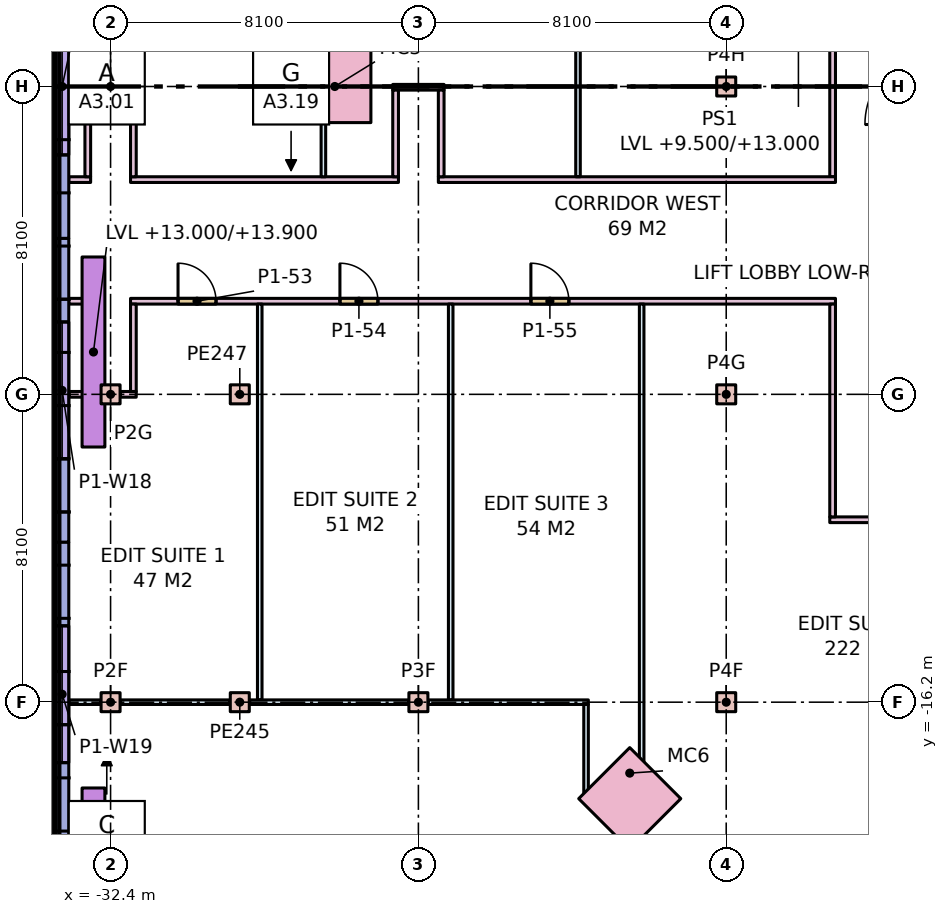
"""IFC4 building model, lengths in metres.
Left out: names, types, materials, properties, quantities, classifications, styles, units other than length and angle.
Written with IfcOpenShell. Run it as: python <this file> out.ifc"""

import sys

from ifc_helpers import new_model, si_unit, direction, frame, frame_2d, origin, origin_2d, place, context, subcontext, project, spatial, rectangle, extrude, element, fill, save


model = new_model("IFC4")
c1 = context("Model", 3, precision=1e-05, world=origin(), true_north=direction((0.0, 1.0)))
c2 = subcontext(c1, "Body", "Model", "MODEL_VIEW")
j1 = project(units=[si_unit("LENGTHUNIT", "METRE"), si_unit("PLANEANGLEUNIT", "RADIAN")], contexts=[c1])
p1 = place(None, origin())
s1 = spatial("IfcSite", under=j1, at=p1, CompositionType="ELEMENT")
p2 = place(p1, origin())
s2 = spatial("IfcBuilding", under=s1, at=p2, CompositionType="ELEMENT")
p3 = place(p2, frame((0.0, 0.0, 6.0)))
s3 = spatial("IfcBuildingStorey", under=s2, at=p3, CompositionType="ELEMENT", Elevation=6.0)
for number, where, z_axis, x_axis in (
    (1, (-32.4, -16.2, 0.0), (0.0, 0.0, 1.0), (1.0, 0.0, 0.0)),
    (2, (-32.4, -8.1, 0.0), (0.0, 0.0, 1.0), (1.0, 0.0, 0.0)),
    (3, (-32.4, 0.0, 0.0), (0.0, 0.0, 1.0), (1.0, 0.0, 0.0)),
    (4, (-24.3, -16.2, 0.0), (0.0, 0.0, 1.0), (1.0, 0.0, 0.0)),
    (5, (-16.2, -16.2, 0.0), (0.0, 0.0, 1.0), (1.0, 0.0, 0.0)),
    (6, (-16.2, -8.1, 0.0), (0.0, 0.0, 1.0), (1.0, 0.0, 0.0)),
    (7, (-16.2, 0.0, 0.0), (0.0, 0.0, 1.0), (1.0, 0.0, 0.0)),
    (8, (-29.0, -16.2, 0.0), (0.0, 0.0, 1.0), (1.0, 0.0, 0.0)),
    (9, (-29.0, -8.1, 0.0), (0.0, 0.0, 1.0), (1.0, 0.0, 0.0)),
):
    element("IfcColumn", number, at=place(p3, frame(where, z_axis=z_axis, x_axis=x_axis)), inside=s3, PredefinedType="COLUMN", context=c2, shape_type="SweptSolid", body=[
        extrude(rectangle(XDim=0.5, YDim=0.5, at=origin_2d()), origin(), (0.0, 0.0, 1.0), 7.0),
    ])
for number, where, z_axis, x_axis in (
    (10, (-26.5, 0.0, 0.0), (0.0, 0.0, 1.0), (0.0, -1.0, 0.0)),
    (11, (-18.738, -18.738, 0.0), (0.0, 0.0, 1.0), (0.707, -0.707, 0.0)),
):
    element("IfcColumn", number, at=place(p3, frame(where, z_axis=z_axis, x_axis=x_axis)), inside=s3, PredefinedType="COLUMN", context=c2, shape_type="SweptSolid", body=[
        extrude(rectangle(XDim=1.9, YDim=1.9, at=origin_2d()), origin(), (0.0, 0.0, 1.0), 7.0),
    ])
p4 = place(p3, frame((-33.675, 3.998, 0.0), z_axis=(0.0, 0.0, 1.0), x_axis=(0.0, -1.0, 0.0)))
e12 = element("IfcWall", 12, at=p4, inside=s3, PredefinedType="STANDARD", context=c2, shape_type="SweptSolid", body=[
    extrude(rectangle(XDim=7.996, YDim=0.35, at=frame_2d((3.998, 0.0))), origin(), (0.0, 0.0, 1.0), 6.68),
])
p5 = place(p4, frame((2.198, 0.0, 1.0)))
e13 = element("IfcOpeningElement", 13, at=p5, cuts=e12, PredefinedType="OPENING", context=c2, shape_type="SweptSolid", body=[
    extrude(rectangle(XDim=3.6, YDim=4.0, at=frame_2d((1.8, 2.0))), frame((0.0, 0.185, 0.0), z_axis=(0.0, -1.0, 0.0), x_axis=(1.0, 0.0, 0.0)), (0.0, 0.0, 1.0), 0.37),
])
p6 = place(p3, frame((-33.675, -3.998, 0.0), z_axis=(0.0, 0.0, 1.0), x_axis=(0.0, -1.0, 0.0)))
e14 = element("IfcWall", 14, at=p6, inside=s3, PredefinedType="STANDARD", context=c2, shape_type="SweptSolid", body=[
    extrude(rectangle(XDim=7.995, YDim=0.35, at=frame_2d((3.998, 0.0))), origin(), (0.0, 0.0, 1.0), 6.68),
])
p7 = place(p6, frame((2.198, 0.0, 1.0)))
e15 = element("IfcOpeningElement", 15, at=p7, cuts=e14, PredefinedType="OPENING", context=c2, shape_type="SweptSolid", body=[
    extrude(rectangle(XDim=3.6, YDim=4.0, at=frame_2d((1.8, 2.0))), frame((0.0, 0.185, 0.0), z_axis=(0.0, -1.0, 0.0), x_axis=(1.0, 0.0, 0.0)), (0.0, 0.0, 1.0), 0.37),
])
p8 = place(p3, frame((-33.675, -11.993, 0.0), z_axis=(0.0, 0.0, 1.0), x_axis=(0.0, -1.0, 0.0)))
e16 = element("IfcWall", 16, at=p8, inside=s3, PredefinedType="STANDARD", context=c2, shape_type="SweptSolid", body=[
    extrude(rectangle(XDim=7.995, YDim=0.35, at=frame_2d((3.998, 0.0))), origin(), (0.0, 0.0, 1.0), 6.68),
])
p9 = place(p8, frame((2.198, 0.0, 1.0)))
e17 = element("IfcOpeningElement", 17, at=p9, cuts=e16, PredefinedType="OPENING", context=c2, shape_type="SweptSolid", body=[
    extrude(rectangle(XDim=3.6, YDim=4.0, at=frame_2d((1.8, 2.0))), frame((0.0, 0.185, 0.0), z_axis=(0.0, -1.0, 0.0), x_axis=(1.0, 0.0, 0.0)), (0.0, 0.0, 1.0), 0.37),
])
for number, where, z_axis, x_axis in (
    (18, (-32.85, -4.486, 7.0), (0.0, 0.0, 1.0), (0.0, -1.0, 0.0)),
    (19, (-32.85, -18.458, 7.0), (0.0, 0.0, 1.0), (0.0, -1.0, 0.0)),
):
    element("IfcWall", number, at=place(p3, frame(where, z_axis=z_axis, x_axis=x_axis)), inside=s3, PredefinedType="PARAPET", context=c2, shape_type="SweptSolid", body=[
        extrude(rectangle(XDim=5.0, YDim=0.6, at=frame_2d((2.5, 0.0))), origin(), (0.0, 0.0, 1.0), 0.9),
    ])
p10 = place(p3, frame((-28.475, -16.14, 0.0), z_axis=(0.0, 0.0, 1.0), x_axis=(0.0, 1.0, 0.0)))
e20 = element("IfcWall", 20, at=p10, inside=s3, PredefinedType="PARTITIONING", context=c2, shape_type="SweptSolid", body=[
    extrude(rectangle(XDim=10.415, YDim=0.12, at=frame_2d((5.208, 0.0))), origin(), (0.0, 0.0, 1.0), 6.68),
])
p11 = place(p3, frame((-33.5, -16.2, 0.0), z_axis=(0.0, 0.0, 1.0), x_axis=(1.0, 0.0, 0.0)))
e21 = element("IfcWall", 21, at=p11, inside=s3, PredefinedType="PARTITIONING", context=c2, shape_type="SweptSolid", body=[
    extrude(rectangle(XDim=0.84, YDim=0.12, at=frame_2d((0.42, 0.0))), origin(), (0.0, 0.0, 1.0), 6.68),
])
p12 = place(p3, frame((-32.14, -16.2, 0.0), z_axis=(0.0, 0.0, 1.0), x_axis=(1.0, 0.0, 0.0)))
e22 = element("IfcWall", 22, at=p12, inside=s3, PredefinedType="PARTITIONING", context=c2, shape_type="SweptSolid", body=[
    extrude(rectangle(XDim=2.88, YDim=0.12, at=frame_2d((1.44, 0.0))), origin(), (0.0, 0.0, 1.0), 6.68),
])
p13 = place(p3, frame((-28.74, -16.2, 0.0), z_axis=(0.0, 0.0, 1.0), x_axis=(1.0, 0.0, 0.0)))
e23 = element("IfcWall", 23, at=p13, inside=s3, PredefinedType="PARTITIONING", context=c2, shape_type="SweptSolid", body=[
    extrude(rectangle(XDim=4.18, YDim=0.12, at=frame_2d((2.09, 0.0))), origin(), (0.0, 0.0, 1.0), 6.68),
])
p14 = place(p3, frame((-33.49, -8.1, 0.0), z_axis=(0.0, 0.0, 1.0), x_axis=(1.0, 0.0, 0.0)))
e24 = element("IfcWall", 24, at=p14, inside=s3, PredefinedType="PARTITIONING", context=c2, shape_type="SweptSolid", body=[
    extrude(rectangle(XDim=0.83, YDim=0.15, at=frame_2d((0.415, 0.0))), origin(), (0.0, 0.0, 1.0), 6.68),
])
p15 = place(p3, frame((-32.14, -8.1, 0.0), z_axis=(0.0, 0.0, 1.0), x_axis=(1.0, 0.0, 0.0)))
e25 = element("IfcWall", 25, at=p15, inside=s3, PredefinedType="PARTITIONING", context=c2, shape_type="SweptSolid", body=[
    extrude(rectangle(XDim=0.415, YDim=0.15, at=frame_2d((0.208, 0.0))), origin(), (0.0, 0.0, 1.0), 6.68),
])
p16 = place(p3, frame((-33.5, -5.65, 0.0), z_axis=(0.0, 0.0, 1.0), x_axis=(1.0, 0.0, 0.0)))
e26 = element("IfcWall", 26, at=p16, inside=s3, PredefinedType="PARTITIONING", context=c2, shape_type="SweptSolid", body=[
    extrude(rectangle(XDim=0.575, YDim=0.15, at=frame_2d((0.288, 0.0))), origin(), (0.0, 0.0, 1.0), 6.68),
])
p17 = place(p3, frame((-31.875, -5.65, 0.0), z_axis=(0.0, 0.0, 1.0), x_axis=(1.0, 0.0, 0.0)))
e27 = element("IfcWall", 27, at=p17, inside=s3, PredefinedType="PARTITIONING", context=c2, shape_type="SweptSolid", body=[
    extrude(rectangle(XDim=18.55, YDim=0.15, at=frame_2d((9.275, 0.0))), origin(), (0.0, 0.0, 1.0), 6.68),
])
p18 = place(p17, frame((1.25, 0.0, 0.0)))
e28 = element("IfcOpeningElement", 28, at=p18, cuts=e27, PredefinedType="OPENING", context=c2, shape_type="SweptSolid", body=[
    extrude(rectangle(XDim=1.0, YDim=2.1, at=frame_2d((0.5, 1.05))), frame((0.0, 0.085, 0.0), z_axis=(0.0, -1.0, 0.0), x_axis=(1.0, 0.0, 0.0)), (0.0, 0.0, 1.0), 0.17),
])
p19 = place(p17, frame((5.51, 0.0, 0.0)))
e29 = element("IfcOpeningElement", 29, at=p19, cuts=e27, PredefinedType="OPENING", context=c2, shape_type="SweptSolid", body=[
    extrude(rectangle(XDim=1.0, YDim=2.1, at=frame_2d((0.5, 1.05))), frame((0.0, 0.085, 0.0), z_axis=(0.0, -1.0, 0.0), x_axis=(1.0, 0.0, 0.0)), (0.0, 0.0, 1.0), 0.17),
])
p20 = place(p17, frame((10.535, 0.0, 0.0)))
e30 = element("IfcOpeningElement", 30, at=p20, cuts=e27, PredefinedType="OPENING", context=c2, shape_type="SweptSolid", body=[
    extrude(rectangle(XDim=1.0, YDim=2.1, at=frame_2d((0.5, 1.05))), frame((0.0, 0.085, 0.0), z_axis=(0.0, -1.0, 0.0), x_axis=(1.0, 0.0, 0.0)), (0.0, 0.0, 1.0), 0.17),
])
for number, where, z_axis, x_axis in (
    (31, (-33.0, -8.025, 0.0), (0.0, 0.0, 1.0), (0.0, 1.0, 0.0)),
    (32, (-31.8, -8.025, 0.0), (0.0, 0.0, 1.0), (0.0, 1.0, 0.0)),
):
    element("IfcWall", number, at=place(p3, frame(where, z_axis=z_axis, x_axis=x_axis)), inside=s3, PredefinedType="PARTITIONING", context=c2, shape_type="SweptSolid", body=[
        extrude(rectangle(XDim=2.3, YDim=0.15, at=frame_2d((1.15, 0.0))), origin(), (0.0, 0.0, 1.0), 6.68),
    ])
p21 = place(p3, frame((-23.45, -16.14, 0.0), z_axis=(0.0, 0.0, 1.0), x_axis=(0.0, 1.0, 0.0)))
e33 = element("IfcWall", 33, at=p21, inside=s3, PredefinedType="PARTITIONING", context=c2, shape_type="SweptSolid", body=[
    extrude(rectangle(XDim=10.415, YDim=0.12, at=frame_2d((5.208, 0.0))), origin(), (0.0, 0.0, 1.0), 6.68),
])
p22 = place(p3, frame((-24.04, -16.2, 0.0), z_axis=(0.0, 0.0, 1.0), x_axis=(1.0, 0.0, 0.0)))
e34 = element("IfcWall", 34, at=p22, inside=s3, PredefinedType="PARTITIONING", context=c2, shape_type="SweptSolid", body=[
    extrude(rectangle(XDim=4.212, YDim=0.12, at=frame_2d((2.106, 0.0))), origin(), (0.0, 0.0, 1.0), 6.68),
])
p23 = place(p3, frame((-19.948, -18.738, 0.0), z_axis=(0.0, 0.0, 1.0), x_axis=(1.0, 0.0, 0.0)))
e35 = element("IfcWall", 35, at=p23, inside=s3, PredefinedType="PARTITIONING", context=c2, shape_type="SweptSolid", body=[
    extrude(rectangle(XDim=0.25, YDim=0.12, at=frame_2d((0.125, 0.0))), origin(), (0.0, 0.0, 1.0), 6.68),
])
p24 = place(p3, frame((-19.888, -18.678, 0.0), z_axis=(0.0, 0.0, 1.0), x_axis=(0.0, 1.0, 0.0)))
e36 = element("IfcWall", 36, at=p24, inside=s3, PredefinedType="PARTITIONING", context=c2, shape_type="SweptSolid", body=[
    extrude(rectangle(XDim=2.418, YDim=0.12, at=frame_2d((1.209, 0.0))), origin(), (0.0, 0.0, 1.0), 6.68),
])
p25 = place(p3, frame((-18.425, -17.778, 0.0), z_axis=(0.0, 0.0, 1.0), x_axis=(0.0, 1.0, 0.0)))
e37 = element("IfcWall", 37, at=p25, inside=s3, PredefinedType="PARTITIONING", context=c2, shape_type="SweptSolid", body=[
    extrude(rectangle(XDim=12.053, YDim=0.12, at=frame_2d((6.027, 0.0))), origin(), (0.0, 0.0, 1.0), 6.68),
])
p26 = place(p3, frame((-13.475, -11.4, 0.0), z_axis=(0.0, 0.0, 1.0), x_axis=(1.0, 0.0, 0.0)))
e38 = element("IfcWall", 38, at=p26, inside=s3, PredefinedType="PARTITIONING", context=c2, shape_type="SweptSolid", body=[
    extrude(rectangle(XDim=4.35, YDim=0.15, at=frame_2d((2.175, 0.0))), origin(), (0.0, 0.0, 1.0), 6.68),
])
p27 = place(p26, frame((1.65, 0.0, 0.0)))
e39 = element("IfcOpeningElement", 39, at=p27, cuts=e38, PredefinedType="OPENING", context=c2, shape_type="SweptSolid", body=[
    extrude(rectangle(XDim=1.0, YDim=2.1, at=frame_2d((0.5, 1.05))), frame((0.0, 0.085, 0.0), z_axis=(0.0, -1.0, 0.0), x_axis=(1.0, 0.0, 0.0)), (0.0, 0.0, 1.0), 0.17),
])
p28 = place(p3, frame((-13.4, -11.325, 0.0), z_axis=(0.0, 0.0, 1.0), x_axis=(0.0, 1.0, 0.0)))
e40 = element("IfcWall", 40, at=p28, inside=s3, PredefinedType="PARTITIONING", context=c2, shape_type="SweptSolid", body=[
    extrude(rectangle(XDim=5.6, YDim=0.15, at=frame_2d((2.8, 0.0))), origin(), (0.0, 0.0, 1.0), 6.68),
])
p29 = place(p3, frame((-13.4, -2.375, 0.0), z_axis=(0.0, 0.0, 1.0), x_axis=(0.0, 1.0, 0.0)))
e41 = element("IfcWall", 41, at=p29, inside=s3, PredefinedType="PARTITIONING", context=c2, shape_type="SweptSolid", body=[
    extrude(rectangle(XDim=4.05, YDim=0.15, at=frame_2d((2.025, 0.0))), origin(), (0.0, 0.0, 1.0), 6.68),
])
p30 = place(p3, frame((-26.8, -2.375, 0.0), z_axis=(0.0, 0.0, 1.0), x_axis=(0.0, 1.0, 0.0)))
e42 = element("IfcWall", 42, at=p30, inside=s3, PredefinedType="PARTITIONING", context=c2, shape_type="SweptSolid", body=[
    extrude(rectangle(XDim=1.415, YDim=0.12, at=frame_2d((0.708, 0.0))), origin(), (0.0, 0.0, 1.0), 6.68),
])
p31 = place(p3, frame((-33.5, -2.45, 0.0), z_axis=(0.0, 0.0, 1.0), x_axis=(1.0, 0.0, 0.0)))
e43 = element("IfcWall", 43, at=p31, inside=s3, PredefinedType="PARTITIONING", context=c2, shape_type="SweptSolid", body=[
    extrude(rectangle(XDim=0.575, YDim=0.15, at=frame_2d((0.288, 0.0))), origin(), (0.0, 0.0, 1.0), 6.68),
])
p32 = place(p3, frame((-31.875, -2.45, 0.0), z_axis=(0.0, 0.0, 1.0), x_axis=(1.0, 0.0, 0.0)))
e44 = element("IfcWall", 44, at=p32, inside=s3, PredefinedType="PARTITIONING", context=c2, shape_type="SweptSolid", body=[
    extrude(rectangle(XDim=7.05, YDim=0.15, at=frame_2d((3.525, 0.0))), origin(), (0.0, 0.0, 1.0), 6.68),
])
p33 = place(p3, frame((-33.49, -0.02, 0.0), z_axis=(0.0, 0.0, 1.0), x_axis=(1.0, 0.0, 0.0)))
e45 = element("IfcWall", 45, at=p33, inside=s3, PredefinedType="PARTITIONING", context=c2, shape_type="SweptSolid", body=[
    extrude(rectangle(XDim=0.83, YDim=0.15, at=frame_2d((0.415, 0.0))), origin(), (0.0, 0.0, 1.0), 6.68),
])
p34 = place(p3, frame((-32.14, -0.02, 0.0), z_axis=(0.0, 0.0, 1.0), x_axis=(1.0, 0.0, 0.0)))
e46 = element("IfcWall", 46, at=p34, inside=s3, PredefinedType="PARTITIONING", context=c2, shape_type="SweptSolid", body=[
    extrude(rectangle(XDim=0.415, YDim=0.15, at=frame_2d((0.208, 0.0))), origin(), (0.0, 0.0, 1.0), 6.68),
])
for number, where, z_axis, x_axis in (
    (47, (-33.0, -2.375, 0.0), (0.0, 0.0, 1.0), (0.0, 1.0, 0.0)),
    (48, (-31.8, -2.375, 0.0), (0.0, 0.0, 1.0), (0.0, 1.0, 0.0)),
):
    element("IfcWall", number, at=place(p3, frame(where, z_axis=z_axis, x_axis=x_axis)), inside=s3, PredefinedType="PARTITIONING", context=c2, shape_type="SweptSolid", body=[
        extrude(rectangle(XDim=2.28, YDim=0.15, at=frame_2d((1.14, 0.0))), origin(), (0.0, 0.0, 1.0), 6.68),
    ])
p35 = place(p3, frame((-20.1, -2.375, 0.0), z_axis=(0.0, 0.0, 1.0), x_axis=(0.0, 1.0, 0.0)))
e49 = element("IfcWall", 49, at=p35, inside=s3, PredefinedType="PARTITIONING", context=c2, shape_type="SweptSolid", body=[
    extrude(rectangle(XDim=20.95, YDim=0.12, at=frame_2d((10.475, 0.0))), origin(), (0.0, 0.0, 1.0), 6.68),
])
p36 = place(p3, frame((-23.775, -2.45, 0.0), z_axis=(0.0, 0.0, 1.0), x_axis=(1.0, 0.0, 0.0)))
e50 = element("IfcWall", 50, at=p36, inside=s3, PredefinedType="PARTITIONING", context=c2, shape_type="SweptSolid", body=[
    extrude(rectangle(XDim=10.45, YDim=0.15, at=frame_2d((5.225, 0.0))), origin(), (0.0, 0.0, 1.0), 6.68),
])
p37 = place(p3, frame((-24.975, -0.02, 0.0), z_axis=(0.0, 0.0, 1.0), x_axis=(1.0, 0.0, 0.0)))
e51 = element("IfcWall", 51, at=p37, inside=s3, PredefinedType="PARTITIONING", context=c2, shape_type="SweptSolid", body=[
    extrude(rectangle(XDim=1.35, YDim=0.15, at=frame_2d((0.675, 0.0))), origin(), (0.0, 0.0, 1.0), 6.68),
])
for number, where, z_axis, x_axis in (
    (52, (-24.9, -2.375, 0.0), (0.0, 0.0, 1.0), (0.0, 1.0, 0.0)),
    (53, (-23.7, -2.375, 0.0), (0.0, 0.0, 1.0), (0.0, 1.0, 0.0)),
):
    element("IfcWall", number, at=place(p3, frame(where, z_axis=z_axis, x_axis=x_axis)), inside=s3, PredefinedType="PARTITIONING", context=c2, shape_type="SweptSolid", body=[
        extrude(rectangle(XDim=2.28, YDim=0.15, at=frame_2d((1.14, 0.0))), origin(), (0.0, 0.0, 1.0), 6.68),
    ])
p38 = place(p5, origin())
e54 = element("IfcWindow", 54, at=p38, inside=s3, PartitioningType="SINGLE_PANEL", PredefinedType="WINDOW", context=c2, shape_type="SweptSolid", body=[
    extrude(rectangle(XDim=3.6, YDim=4.0, at=frame_2d((1.8, 2.0))), frame((0.0, 0.03, 0.0), z_axis=(0.0, -1.0, 0.0), x_axis=(1.0, 0.0, 0.0)), (0.0, 0.0, 1.0), 0.06),
])
fill(e13, e54)
p39 = place(p7, origin())
e55 = element("IfcWindow", 55, at=p39, inside=s3, PartitioningType="SINGLE_PANEL", PredefinedType="WINDOW", context=c2, shape_type="SweptSolid", body=[
    extrude(rectangle(XDim=3.6, YDim=4.0, at=frame_2d((1.8, 2.0))), frame((0.0, 0.03, 0.0), z_axis=(0.0, -1.0, 0.0), x_axis=(1.0, 0.0, 0.0)), (0.0, 0.0, 1.0), 0.06),
])
fill(e15, e55)
p40 = place(p9, origin())
e56 = element("IfcWindow", 56, at=p40, inside=s3, PartitioningType="SINGLE_PANEL", PredefinedType="WINDOW", context=c2, shape_type="SweptSolid", body=[
    extrude(rectangle(XDim=3.6, YDim=4.0, at=frame_2d((1.8, 2.0))), frame((0.0, 0.03, 0.0), z_axis=(0.0, -1.0, 0.0), x_axis=(1.0, 0.0, 0.0)), (0.0, 0.0, 1.0), 0.06),
])
fill(e17, e56)
p41 = place(p18, origin())
e57 = element("IfcDoor", 57, at=p41, inside=s3, OperationType="SINGLE_SWING_LEFT", PredefinedType="DOOR", context=c2, shape_type="SweptSolid", body=[
    extrude(rectangle(XDim=1.0, YDim=2.1, at=frame_2d((0.5, 1.05))), frame((0.0, 0.025, 0.0), z_axis=(0.0, -1.0, 0.0), x_axis=(1.0, 0.0, 0.0)), (0.0, 0.0, 1.0), 0.05),
])
fill(e28, e57)
p42 = place(p19, origin())
e58 = element("IfcDoor", 58, at=p42, inside=s3, OperationType="SINGLE_SWING_LEFT", PredefinedType="DOOR", context=c2, shape_type="SweptSolid", body=[
    extrude(rectangle(XDim=1.0, YDim=2.1, at=frame_2d((0.5, 1.05))), frame((0.0, 0.025, 0.0), z_axis=(0.0, -1.0, 0.0), x_axis=(1.0, 0.0, 0.0)), (0.0, 0.0, 1.0), 0.05),
])
fill(e29, e58)
p43 = place(p20, origin())
e59 = element("IfcDoor", 59, at=p43, inside=s3, OperationType="SINGLE_SWING_LEFT", PredefinedType="DOOR", context=c2, shape_type="SweptSolid", body=[
    extrude(rectangle(XDim=1.0, YDim=2.1, at=frame_2d((0.5, 1.05))), frame((0.0, 0.025, 0.0), z_axis=(0.0, -1.0, 0.0), x_axis=(1.0, 0.0, 0.0)), (0.0, 0.0, 1.0), 0.05),
])
fill(e30, e59)
save(model, sys.argv[1])
